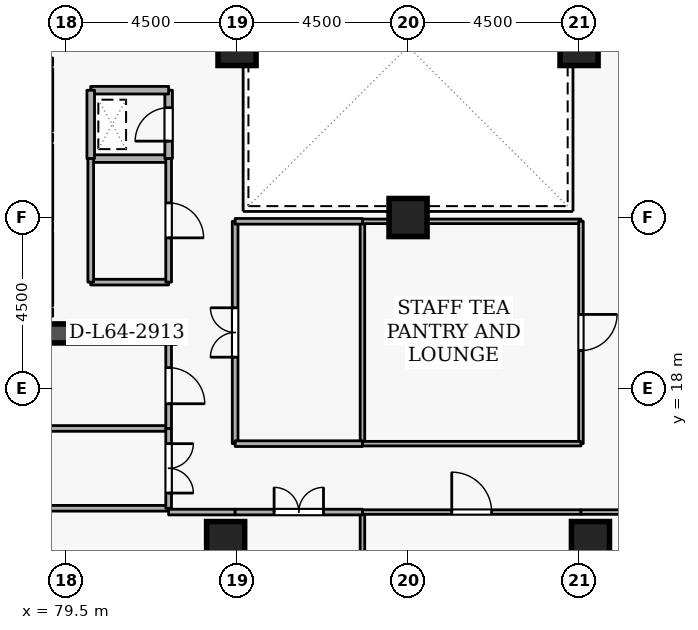
"""IFC4 building model, lengths in metres.
Left out: names, types, materials, properties, quantities, classifications, styles, units other than length and angle.
Written with IfcOpenShell. Run it as: python <this file> out.ifc"""

import sys

from ifc_helpers import new_model, si_unit, direction, frame, frame_2d, origin, origin_2d, place, context, subcontext, project, spatial, rectangle, extrude, element, fill, save


model = new_model("IFC4")
c1 = context("Model", 3, precision=1e-05, world=origin(), true_north=direction((0.0, 1.0)))
c2 = subcontext(c1, "Body", "Model", "MODEL_VIEW")
j1 = project(units=[si_unit("LENGTHUNIT", "METRE"), si_unit("PLANEANGLEUNIT", "RADIAN")], contexts=[c1])
p1 = place(None, origin())
s1 = spatial("IfcSite", under=j1, at=p1, CompositionType="ELEMENT")
p2 = place(p1, origin())
s2 = spatial("IfcBuilding", under=s1, at=p2, CompositionType="ELEMENT")
p3 = place(p2, frame((0.0, 0.0, 240.3)))
s3 = spatial("IfcBuildingStorey", under=s2, at=p3, CompositionType="ELEMENT", Elevation=240.3)
p4 = place(p3, frame((76.6, 19.45, 0.0), z_axis=(0.0, 0.0, 1.0), x_axis=(1.0, 0.0, 0.0)))
e1 = element("IfcWall", 1, at=p4, inside=s3, PredefinedType="SHEAR", context=c2, shape_type="SweptSolid", body=[
    extrude(rectangle(XDim=5.8, YDim=0.5, at=frame_2d((2.9, 0.0))), origin(), (0.0, 0.0, 1.0), 3.6),
])
for number, where, z_axis, x_axis in (
    (2, (93.3, 14.0, 0.0), (0.0, 0.0, 1.0), (1.0, 0.0, 0.0)),
    (3, (83.7, 14.0, 0.0), (0.0, 0.0, 1.0), (1.0, 0.0, 0.0)),
    (4, (93.0, 27.0, 0.0), (0.0, 0.0, 1.0), (1.0, 0.0, 0.0)),
    (5, (84.0, 27.0, 0.0), (0.0, 0.0, 1.0), (1.0, 0.0, 0.0)),
    (6, (88.5, 22.5, 0.0), (0.0, 0.0, 1.0), (1.0, 0.0, 0.0)),
):
    element("IfcColumn", number, at=place(p3, frame(where, z_axis=z_axis, x_axis=x_axis)), inside=s3, PredefinedType="COLUMN", context=c2, shape_type="SweptSolid", body=[
        extrude(rectangle(XDim=1.0, YDim=1.0, at=origin_2d()), origin(), (0.0, 0.0, 1.0), 3.6),
    ])
p5 = place(p3, frame((79.05, 24.78, 0.0), z_axis=(0.0, 0.0, 1.0), x_axis=(0.0, 1.0, 0.0)))
e7 = element("IfcWall", 7, at=p5, inside=s3, PredefinedType="STANDARD", context=c2, shape_type="SweptSolid", body=[
    extrude(rectangle(XDim=1.64, YDim=0.2, at=frame_2d((0.82, 0.0))), origin(), (0.0, 0.0, 1.0), 3.34),
])
p6 = place(p5, frame((0.31, 0.0, 0.0)))
e8 = element("IfcOpeningElement", 8, at=p6, cuts=e7, PredefinedType="OPENING", context=c2, shape_type="SweptSolid", body=[
    extrude(rectangle(XDim=1.02, YDim=2.06, at=frame_2d((0.51, 1.03))), frame((0.0, 0.11, 0.0), z_axis=(0.0, -1.0, 0.0), x_axis=(1.0, 0.0, 0.0)), (0.0, 0.0, 1.0), 0.22),
])
p7 = place(p3, frame((79.05, 22.43, 0.0), z_axis=(0.0, 0.0, 1.0), x_axis=(0.0, 1.0, 0.0)))
e9 = element("IfcWall", 9, at=p7, inside=s3, PredefinedType="STANDARD", context=c2, shape_type="SweptSolid", body=[
    extrude(rectangle(XDim=1.99, YDim=0.2, at=frame_2d((0.995, 0.0))), origin(), (0.0, 0.0, 1.0), 3.34),
])
p8 = place(p7, frame((0.485, 0.0, 0.0)))
e10 = element("IfcOpeningElement", 10, at=p8, cuts=e9, PredefinedType="OPENING", context=c2, shape_type="SweptSolid", body=[
    extrude(rectangle(XDim=1.02, YDim=2.06, at=frame_2d((0.51, 1.03))), frame((0.0, 0.11, 0.0), z_axis=(0.0, -1.0, 0.0), x_axis=(1.0, 0.0, 0.0)), (0.0, 0.0, 1.0), 0.22),
])
p9 = place(p3, frame((79.05, 20.18, 0.0), z_axis=(0.0, 0.0, 1.0), x_axis=(0.0, 1.0, 0.0)))
e11 = element("IfcWall", 11, at=p9, inside=s3, PredefinedType="STANDARD", context=c2, shape_type="SweptSolid", body=[
    extrude(rectangle(XDim=1.94, YDim=0.2, at=frame_2d((0.97, 0.0))), origin(), (0.0, 0.0, 1.0), 3.34),
])
p10 = place(p9, frame((0.46, 0.0, 0.0)))
e12 = element("IfcOpeningElement", 12, at=p10, cuts=e11, PredefinedType="OPENING", context=c2, shape_type="SweptSolid", body=[
    extrude(rectangle(XDim=1.02, YDim=2.06, at=frame_2d((0.51, 1.03))), frame((0.0, 0.11, 0.0), z_axis=(0.0, -1.0, 0.0), x_axis=(1.0, 0.0, 0.0)), (0.0, 0.0, 1.0), 0.22),
])
p11 = place(p3, frame((80.15, 24.05, 0.0), z_axis=(0.0, 0.0, 1.0), x_axis=(1.0, 0.0, 0.0)))
e13 = element("IfcWall", 13, at=p11, inside=s3, PredefinedType="STANDARD", context=c2, shape_type="SweptSolid", body=[
    extrude(rectangle(XDim=2.05, YDim=0.2, at=frame_2d((1.025, 0.0))), origin(), (0.0, 0.0, 1.0), 3.34),
])
p12 = place(p3, frame((82.2, 24.05, 0.0), z_axis=(0.0, 0.0, 1.0), x_axis=(0.0, 1.0, 0.0)))
e14 = element("IfcWall", 14, at=p12, inside=s3, PredefinedType="STANDARD", context=c2, shape_type="SweptSolid", body=[
    extrude(rectangle(XDim=1.8, YDim=0.2, at=frame_2d((0.9, 0.0))), origin(), (0.0, 0.0, 1.0), 3.34),
])
p13 = place(p12, frame((0.46, 0.0, 0.0)))
e15 = element("IfcOpeningElement", 15, at=p13, cuts=e14, PredefinedType="OPENING", context=c2, shape_type="SweptSolid", body=[
    extrude(rectangle(XDim=0.88, YDim=2.04, at=frame_2d((0.44, 1.02))), frame((0.0, 0.11, 0.0), z_axis=(0.0, -1.0, 0.0), x_axis=(1.0, 0.0, 0.0)), (0.0, 0.0, 1.0), 0.22),
])
p14 = place(p3, frame((82.2, 25.85, 0.0), z_axis=(0.0, 0.0, 1.0), x_axis=(-1.0, 0.0, 0.0)))
e16 = element("IfcWall", 16, at=p14, inside=s3, PredefinedType="STANDARD", context=c2, shape_type="SweptSolid", body=[
    extrude(rectangle(XDim=2.05, YDim=0.2, at=frame_2d((1.025, 0.0))), origin(), (0.0, 0.0, 1.0), 3.34),
])
p15 = place(p3, frame((80.15, 25.85, 0.0), z_axis=(0.0, 0.0, 1.0), x_axis=(0.0, -1.0, 0.0)))
e17 = element("IfcWall", 17, at=p15, inside=s3, PredefinedType="STANDARD", context=c2, shape_type="SweptSolid", body=[
    extrude(rectangle(XDim=1.8, YDim=0.2, at=frame_2d((0.9, 0.0))), origin(), (0.0, 0.0, 1.0), 3.34),
])
p16 = place(p3, frame((82.2, 20.8, 0.0), z_axis=(0.0, 0.0, 1.0), x_axis=(-1.0, 0.0, 0.0)))
e18 = element("IfcWall", 18, at=p16, inside=s3, PredefinedType="PARTITIONING", context=c2, shape_type="SweptSolid", body=[
    extrude(rectangle(XDim=2.05, YDim=0.15, at=frame_2d((1.025, 0.0))), origin(), (0.0, 0.0, 1.0), 3.34),
])
p17 = place(p3, frame((80.15, 20.8, 0.0), z_axis=(0.0, 0.0, 1.0), x_axis=(0.0, 1.0, 0.0)))
e19 = element("IfcWall", 19, at=p17, inside=s3, PredefinedType="PARTITIONING", context=c2, shape_type="SweptSolid", body=[
    extrude(rectangle(XDim=3.25, YDim=0.15, at=frame_2d((1.625, 0.0))), origin(), (0.0, 0.0, 1.0), 3.34),
])
p18 = place(p3, frame((82.2, 24.05, 0.0), z_axis=(0.0, 0.0, 1.0), x_axis=(0.0, -1.0, 0.0)))
e20 = element("IfcWall", 20, at=p18, inside=s3, PredefinedType="PARTITIONING", context=c2, shape_type="SweptSolid", body=[
    extrude(rectangle(XDim=3.25, YDim=0.15, at=frame_2d((1.625, 0.0))), origin(), (0.0, 0.0, 1.0), 3.34),
])
p19 = place(p18, frame((1.165, 0.0, 0.0)))
e21 = element("IfcOpeningElement", 21, at=p19, cuts=e20, PredefinedType="OPENING", context=c2, shape_type="SweptSolid", body=[
    extrude(rectangle(XDim=0.92, YDim=2.08, at=frame_2d((0.46, 1.04))), frame((0.0, 0.085, 0.0), z_axis=(0.0, -1.0, 0.0), x_axis=(1.0, 0.0, 0.0)), (0.0, 0.0, 1.0), 0.17),
])
for number, where, z_axis, x_axis in (
    (22, (82.2, 14.85, 0.0), (0.0, 0.0, 1.0), (-1.0, 0.0, 0.0)),
    (23, (70.78, 16.95, 0.0), (0.0, 0.0, 1.0), (1.0, 0.0, 0.0)),
):
    element("IfcWall", number, at=place(p3, frame(where, z_axis=z_axis, x_axis=x_axis)), inside=s3, PredefinedType="PARTITIONING", context=c2, shape_type="SweptSolid", body=[
        extrude(rectangle(XDim=11.42, YDim=0.15, at=frame_2d((5.71, 0.0))), origin(), (0.0, 0.0, 1.0), 3.34),
    ])
p20 = place(p3, frame((82.2, 16.95, 0.0), z_axis=(0.0, 0.0, 1.0), x_axis=(0.0, -1.0, 0.0)))
e24 = element("IfcWall", 24, at=p20, inside=s3, PredefinedType="PARTITIONING", context=c2, shape_type="SweptSolid", body=[
    extrude(rectangle(XDim=2.1, YDim=0.15, at=frame_2d((1.05, 0.0))), origin(), (0.0, 0.0, 1.0), 3.34),
])
p21 = place(p20, frame((0.4, 0.0, 0.0)))
e25 = element("IfcOpeningElement", 25, at=p21, cuts=e24, PredefinedType="OPENING", context=c2, shape_type="SweptSolid", body=[
    extrude(rectangle(XDim=1.3, YDim=2.12, at=frame_2d((0.65, 1.06))), frame((0.0, 0.085, 0.0), z_axis=(0.0, -1.0, 0.0), x_axis=(1.0, 0.0, 0.0)), (0.0, 0.0, 1.0), 0.17),
])
p22 = place(p3, frame((82.2, 19.2, 0.0), z_axis=(0.0, 0.0, 1.0), x_axis=(0.0, -1.0, 0.0)))
e26 = element("IfcWall", 26, at=p22, inside=s3, PredefinedType="PARTITIONING", context=c2, shape_type="SweptSolid", body=[
    extrude(rectangle(XDim=2.25, YDim=0.15, at=frame_2d((1.125, 0.0))), origin(), (0.0, 0.0, 1.0), 3.34),
])
p23 = place(p22, frame((0.65, 0.0, 0.0)))
e27 = element("IfcOpeningElement", 27, at=p23, cuts=e26, PredefinedType="OPENING", context=c2, shape_type="SweptSolid", body=[
    extrude(rectangle(XDim=0.95, YDim=2.1, at=frame_2d((0.475, 1.05))), frame((0.0, 0.085, 0.0), z_axis=(0.0, -1.0, 0.0), x_axis=(1.0, 0.0, 0.0)), (0.0, 0.0, 1.0), 0.17),
])
p24 = place(p3, frame((87.3, 3.28, 0.0), z_axis=(0.0, 0.0, 1.0), x_axis=(0.0, 1.0, 0.0)))
e28 = element("IfcWall", 28, at=p24, inside=s3, PredefinedType="PARTITIONING", context=c2, shape_type="SweptSolid", body=[
    extrude(rectangle(XDim=11.47, YDim=0.12, at=frame_2d((5.735, 0.0))), origin(), (0.0, 0.0, 1.0), 3.34),
])
p25 = place(p3, frame((87.3, 14.75, 0.0), z_axis=(0.0, 0.0, 1.0), x_axis=(1.0, 0.0, 0.0)))
e29 = element("IfcWall", 29, at=p25, inside=s3, PredefinedType="PARTITIONING", context=c2, shape_type="SweptSolid", body=[
    extrude(rectangle(XDim=5.75, YDim=0.12, at=frame_2d((2.875, 0.0))), origin(), (0.0, 0.0, 1.0), 3.34),
])
p26 = place(p25, frame((2.35, 0.0, 0.0)))
e30 = element("IfcOpeningElement", 30, at=p26, cuts=e29, PredefinedType="OPENING", context=c2, shape_type="SweptSolid", body=[
    extrude(rectangle(XDim=1.05, YDim=2.1, at=frame_2d((0.525, 1.05))), frame((0.0, 0.07, 0.0), z_axis=(0.0, -1.0, 0.0), x_axis=(1.0, 0.0, 0.0)), (0.0, 0.0, 1.0), 0.14),
])
p27 = place(p3, frame((93.05, 14.75, 0.0), z_axis=(0.0, 0.0, 1.0), x_axis=(1.0, 0.0, 0.0)))
e31 = element("IfcWall", 31, at=p27, inside=s3, PredefinedType="PARTITIONING", context=c2, shape_type="SweptSolid", body=[
    extrude(rectangle(XDim=1.75, YDim=0.12, at=frame_2d((0.875, 0.0))), origin(), (0.0, 0.0, 1.0), 3.34),
])
p28 = place(p3, frame((82.2, 14.75, 0.0), z_axis=(0.0, 0.0, 1.0), x_axis=(1.0, 0.0, 0.0)))
e32 = element("IfcWall", 32, at=p28, inside=s3, PredefinedType="PARTITIONING", context=c2, shape_type="SweptSolid", body=[
    extrude(rectangle(XDim=1.75, YDim=0.15, at=frame_2d((0.875, 0.0))), origin(), (0.0, 0.0, 1.0), 3.34),
])
p29 = place(p3, frame((83.95, 14.75, 0.0), z_axis=(0.0, 0.0, 1.0), x_axis=(1.0, 0.0, 0.0)))
e33 = element("IfcWall", 33, at=p29, inside=s3, PredefinedType="PARTITIONING", context=c2, shape_type="SweptSolid", body=[
    extrude(rectangle(XDim=3.35, YDim=0.15, at=frame_2d((1.675, 0.0))), origin(), (0.0, 0.0, 1.0), 3.34),
])
p30 = place(p29, frame((1.025, 0.0, 0.0)))
e34 = element("IfcOpeningElement", 34, at=p30, cuts=e33, PredefinedType="OPENING", context=c2, shape_type="SweptSolid", body=[
    extrude(rectangle(XDim=1.3, YDim=2.12, at=frame_2d((0.65, 1.06))), frame((0.0, 0.085, 0.0), z_axis=(0.0, -1.0, 0.0), x_axis=(1.0, 0.0, 0.0)), (0.0, 0.0, 1.0), 0.17),
])
p31 = place(p3, frame((87.3, 16.55, 0.0), z_axis=(0.0, 0.0, 1.0), x_axis=(0.0, 1.0, 0.0)))
e35 = element("IfcWall", 35, at=p31, inside=s3, PredefinedType="PARTITIONING", context=c2, shape_type="SweptSolid", body=[
    extrude(rectangle(XDim=5.85, YDim=0.12, at=frame_2d((2.925, 0.0))), origin(), (0.0, 0.0, 1.0), 3.34),
])
p32 = place(p3, frame((87.3, 22.4, 0.0), z_axis=(0.0, 0.0, 1.0), x_axis=(1.0, 0.0, 0.0)))
e36 = element("IfcWall", 36, at=p32, inside=s3, PredefinedType="PARTITIONING", context=c2, shape_type="SweptSolid", body=[
    extrude(rectangle(XDim=5.75, YDim=0.12, at=frame_2d((2.875, 0.0))), origin(), (0.0, 0.0, 1.0), 3.34),
])
p33 = place(p3, frame((93.05, 22.4, 0.0), z_axis=(0.0, 0.0, 1.0), x_axis=(0.0, -1.0, 0.0)))
e37 = element("IfcWall", 37, at=p33, inside=s3, PredefinedType="PARTITIONING", context=c2, shape_type="SweptSolid", body=[
    extrude(rectangle(XDim=5.85, YDim=0.12, at=frame_2d((2.925, 0.0))), origin(), (0.0, 0.0, 1.0), 3.34),
])
p34 = place(p33, frame((2.45, 0.0, 0.0)))
e38 = element("IfcOpeningElement", 38, at=p34, cuts=e37, PredefinedType="OPENING", context=c2, shape_type="SweptSolid", body=[
    extrude(rectangle(XDim=0.95, YDim=2.1, at=frame_2d((0.475, 1.05))), frame((0.0, 0.07, 0.0), z_axis=(0.0, -1.0, 0.0), x_axis=(1.0, 0.0, 0.0)), (0.0, 0.0, 1.0), 0.14),
])
p35 = place(p3, frame((93.05, 16.55, 0.0), z_axis=(0.0, 0.0, 1.0), x_axis=(-1.0, 0.0, 0.0)))
e39 = element("IfcWall", 39, at=p35, inside=s3, PredefinedType="PARTITIONING", context=c2, shape_type="SweptSolid", body=[
    extrude(rectangle(XDim=5.75, YDim=0.12, at=frame_2d((2.875, 0.0))), origin(), (0.0, 0.0, 1.0), 3.34),
])
p36 = place(p3, frame((83.95, 16.55, 0.0), z_axis=(0.0, 0.0, 1.0), x_axis=(0.0, 1.0, 0.0)))
e40 = element("IfcWall", 40, at=p36, inside=s3, PredefinedType="PARTITIONING", context=c2, shape_type="SweptSolid", body=[
    extrude(rectangle(XDim=5.85, YDim=0.15, at=frame_2d((2.925, 0.0))), origin(), (0.0, 0.0, 1.0), 3.34),
])
p37 = place(p36, frame((2.275, 0.0, 0.0)))
e41 = element("IfcOpeningElement", 41, at=p37, cuts=e40, PredefinedType="OPENING", context=c2, shape_type="SweptSolid", body=[
    extrude(rectangle(XDim=1.3, YDim=2.12, at=frame_2d((0.65, 1.06))), frame((0.0, 0.085, 0.0), z_axis=(0.0, -1.0, 0.0), x_axis=(1.0, 0.0, 0.0)), (0.0, 0.0, 1.0), 0.17),
])
for number, where, z_axis, x_axis in (
    (42, (83.95, 22.4, 0.0), (0.0, 0.0, 1.0), (1.0, 0.0, 0.0)),
    (43, (87.3, 16.55, 0.0), (0.0, 0.0, 1.0), (-1.0, 0.0, 0.0)),
):
    element("IfcWall", number, at=place(p3, frame(where, z_axis=z_axis, x_axis=x_axis)), inside=s3, PredefinedType="PARTITIONING", context=c2, shape_type="SweptSolid", body=[
        extrude(rectangle(XDim=3.35, YDim=0.15, at=frame_2d((1.675, 0.0))), origin(), (0.0, 0.0, 1.0), 3.34),
    ])
p38 = place(p13, origin())
e44 = element("IfcDoor", 44, at=p38, inside=s3, OperationType="SINGLE_SWING_LEFT", PredefinedType="DOOR", context=c2, shape_type="SweptSolid", body=[
    extrude(rectangle(XDim=0.88, YDim=2.04, at=frame_2d((0.44, 1.02))), frame((0.0, 0.025, 0.0), z_axis=(0.0, -1.0, 0.0), x_axis=(1.0, 0.0, 0.0)), (0.0, 0.0, 1.0), 0.05),
])
fill(e15, e44)
p39 = place(p19, origin())
e45 = element("IfcDoor", 45, at=p39, inside=s3, OperationType="SINGLE_SWING_RIGHT", PredefinedType="DOOR", context=c2, shape_type="SweptSolid", body=[
    extrude(rectangle(XDim=0.92, YDim=2.08, at=frame_2d((0.46, 1.04))), frame((0.0, 0.025, 0.0), z_axis=(0.0, -1.0, 0.0), x_axis=(1.0, 0.0, 0.0)), (0.0, 0.0, 1.0), 0.05),
])
fill(e21, e45)
p40 = place(p21, origin())
e46 = element("IfcDoor", 46, at=p40, inside=s3, OperationType="DOUBLE_DOOR_SINGLE_SWING", PredefinedType="DOOR", context=c2, shape_type="SweptSolid", body=[
    extrude(rectangle(XDim=1.3, YDim=2.12, at=frame_2d((0.65, 1.06))), frame((0.0, 0.025, 0.0), z_axis=(0.0, -1.0, 0.0), x_axis=(1.0, 0.0, 0.0)), (0.0, 0.0, 1.0), 0.05),
])
fill(e25, e46)
p41 = place(p23, origin())
e47 = element("IfcDoor", 47, at=p41, inside=s3, OperationType="SINGLE_SWING_RIGHT", PredefinedType="DOOR", context=c2, shape_type="SweptSolid", body=[
    extrude(rectangle(XDim=0.95, YDim=2.1, at=frame_2d((0.475, 1.05))), frame((0.0, 0.025, 0.0), z_axis=(0.0, -1.0, 0.0), x_axis=(1.0, 0.0, 0.0)), (0.0, 0.0, 1.0), 0.05),
])
fill(e27, e47)
p42 = place(p26, origin())
e48 = element("IfcDoor", 48, at=p42, inside=s3, OperationType="SINGLE_SWING_LEFT", PredefinedType="DOOR", context=c2, shape_type="SweptSolid", body=[
    extrude(rectangle(XDim=1.05, YDim=2.1, at=frame_2d((0.525, 1.05))), frame((0.0, 0.025, 0.0), z_axis=(0.0, -1.0, 0.0), x_axis=(1.0, 0.0, 0.0)), (0.0, 0.0, 1.0), 0.05),
])
fill(e30, e48)
p43 = place(p30, origin())
e49 = element("IfcDoor", 49, at=p43, inside=s3, OperationType="DOUBLE_DOOR_SINGLE_SWING", PredefinedType="DOOR", context=c2, shape_type="SweptSolid", body=[
    extrude(rectangle(XDim=1.3, YDim=2.12, at=frame_2d((0.65, 1.06))), frame((0.0, 0.025, 0.0), z_axis=(0.0, -1.0, 0.0), x_axis=(1.0, 0.0, 0.0)), (0.0, 0.0, 1.0), 0.05),
])
fill(e34, e49)
p44 = place(p34, origin())
e50 = element("IfcDoor", 50, at=p44, inside=s3, OperationType="SINGLE_SWING_LEFT", PredefinedType="DOOR", context=c2, shape_type="SweptSolid", body=[
    extrude(rectangle(XDim=0.95, YDim=2.1, at=frame_2d((0.475, 1.05))), frame((0.0, 0.025, 0.0), z_axis=(0.0, -1.0, 0.0), x_axis=(1.0, 0.0, 0.0)), (0.0, 0.0, 1.0), 0.05),
])
fill(e38, e50)
p45 = place(p37, origin())
e51 = element("IfcDoor", 51, at=p45, inside=s3, OperationType="DOUBLE_DOOR_SINGLE_SWING", PredefinedType="DOOR", context=c2, shape_type="SweptSolid", body=[
    extrude(rectangle(XDim=1.3, YDim=2.12, at=frame_2d((0.65, 1.06))), frame((0.0, 0.025, 0.0), z_axis=(0.0, -1.0, 0.0), x_axis=(1.0, 0.0, 0.0)), (0.0, 0.0, 1.0), 0.05),
])
fill(e41, e51)
save(model, sys.argv[1])
